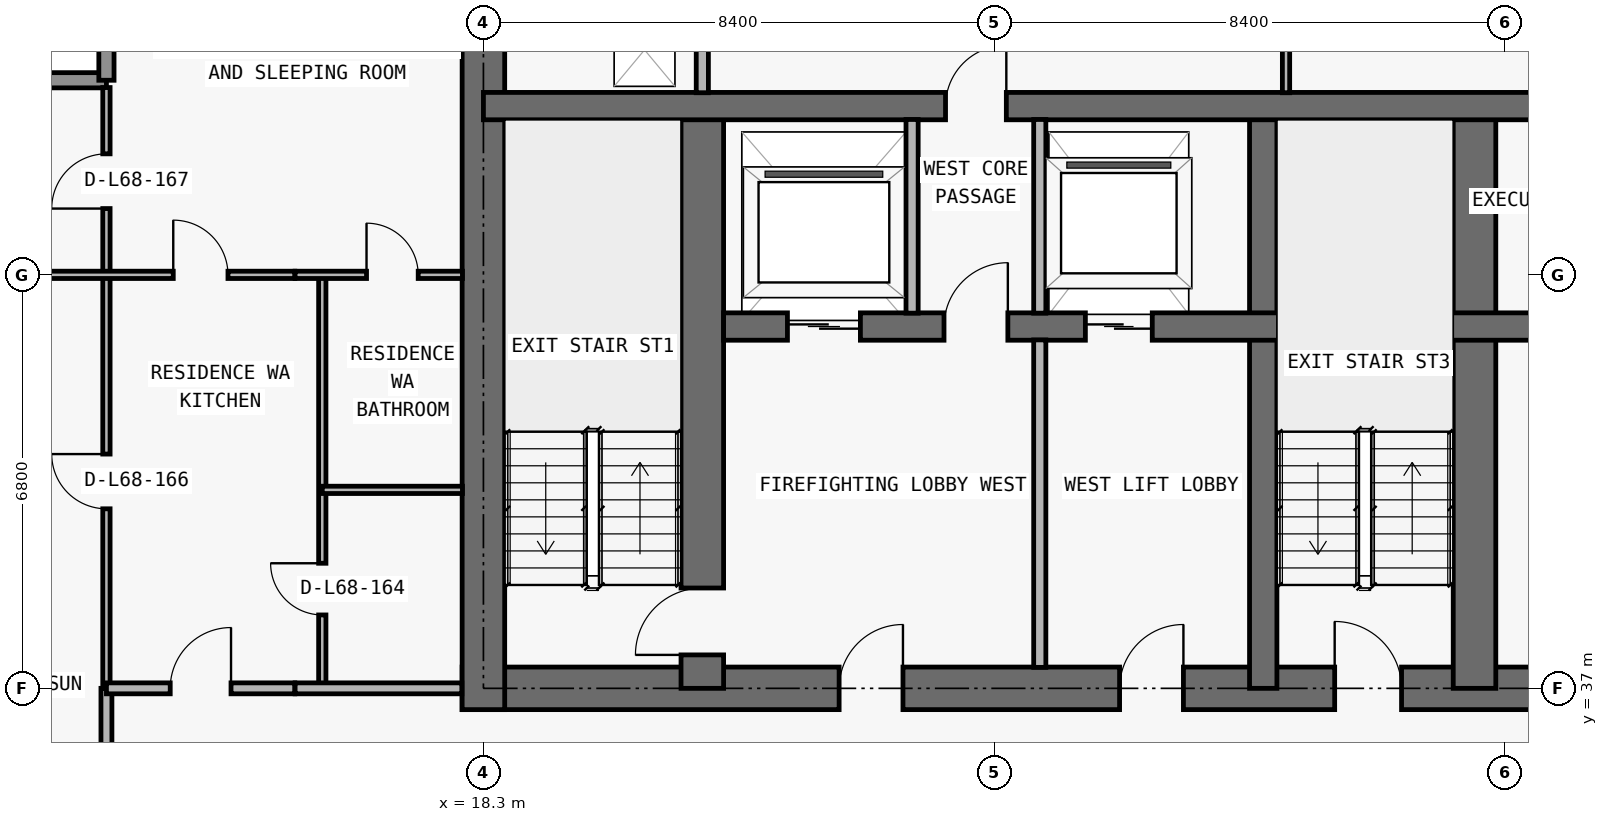
"""IFC4 building model, lengths in metres.
Left out: names, types, materials, properties, quantities, classifications, styles, units other than length and angle.
Written with IfcOpenShell. Run it as: python <this file> out.ifc"""

import sys

from ifc_helpers import new_model, si_unit, direction, frame, frame_2d, origin, place, context, subcontext, project, spatial, rectangle, extrude, element, fill, save


model = new_model("IFC4")
c1 = context("Model", 3, precision=1e-05, world=origin(), true_north=direction((0.0, 1.0)))
c2 = subcontext(c1, "Body", "Model", "MODEL_VIEW")
j1 = project(units=[si_unit("LENGTHUNIT", "METRE"), si_unit("PLANEANGLEUNIT", "RADIAN")], contexts=[c1])
p1 = place(None, origin())
s1 = spatial("IfcSite", under=j1, at=p1, CompositionType="ELEMENT")
p2 = place(p1, origin())
s2 = spatial("IfcBuilding", under=s1, at=p2, CompositionType="ELEMENT")
p3 = place(p2, frame((0.0, 0.0, 243.0)))
s3 = spatial("IfcBuildingStorey", under=s2, at=p3, CompositionType="ELEMENT", Elevation=243.0)
p4 = place(p3, frame((17.95, 37.0, 0.0), z_axis=(0.0, 0.0, 1.0), x_axis=(1.0, 0.0, 0.0)))
e1 = element("IfcWall", 1, at=p4, inside=s3, PredefinedType="SHEAR", context=c2, shape_type="SweptSolid", body=[
    extrude(rectangle(XDim=41.9, YDim=0.7, at=frame_2d((20.95, 0.0))), origin(), (0.0, 0.0, 1.0), 3.05),
])
p5 = place(p4, frame((14.35, 0.0, 0.0)))
e2 = element("IfcOpeningElement", 2, at=p5, cuts=e1, PredefinedType="OPENING", context=c2, shape_type="SweptSolid", body=[
    extrude(rectangle(XDim=1.1, YDim=2.15, at=frame_2d((0.55, 1.075))), frame((0.0, 0.36, 0.0), z_axis=(0.0, -1.0, 0.0), x_axis=(1.0, 0.0, 0.0)), (0.0, 0.0, 1.0), 0.72),
])
p6 = place(p4, frame((6.2, 0.0, 0.0)))
e3 = element("IfcOpeningElement", 3, at=p6, cuts=e1, PredefinedType="OPENING", context=c2, shape_type="SweptSolid", body=[
    extrude(rectangle(XDim=1.05, YDim=2.15, at=frame_2d((0.525, 1.075))), frame((0.0, 0.36, 0.0), z_axis=(0.0, -1.0, 0.0), x_axis=(1.0, 0.0, 0.0)), (0.0, 0.0, 1.0), 0.72),
])
p7 = place(p4, frame((34.7, 0.0, 0.0)))
e4 = element("IfcOpeningElement", 4, at=p7, cuts=e1, PredefinedType="OPENING", context=c2, shape_type="SweptSolid", body=[
    extrude(rectangle(XDim=1.05, YDim=2.15, at=frame_2d((0.525, 1.075))), frame((0.0, 0.36, 0.0), z_axis=(0.0, -1.0, 0.0), x_axis=(1.0, 0.0, 0.0)), (0.0, 0.0, 1.0), 0.72),
])
p8 = place(p4, frame((10.812, 0.0, 0.0)))
e5 = element("IfcOpeningElement", 5, at=p8, cuts=e1, PredefinedType="OPENING", context=c2, shape_type="SweptSolid", body=[
    extrude(rectangle(XDim=1.05, YDim=2.15, at=frame_2d((0.525, 1.075))), frame((0.0, 0.36, 0.0), z_axis=(0.0, -1.0, 0.0), x_axis=(1.0, 0.0, 0.0)), (0.0, 0.0, 1.0), 0.72),
])
p9 = place(p4, frame((24.05, 0.0, 0.0)))
e6 = element("IfcOpeningElement", 6, at=p9, cuts=e1, PredefinedType="OPENING", context=c2, shape_type="SweptSolid", body=[
    extrude(rectangle(XDim=1.05, YDim=2.15, at=frame_2d((0.525, 1.075))), frame((0.0, 0.36, 0.0), z_axis=(0.0, -1.0, 0.0), x_axis=(1.0, 0.0, 0.0)), (0.0, 0.0, 1.0), 0.72),
])
p10 = place(p3, frame((18.3, 36.65, 0.0), z_axis=(0.0, 0.0, 1.0), x_axis=(0.0, 1.0, 0.0)))
e7 = element("IfcWall", 7, at=p10, inside=s3, PredefinedType="SHEAR", context=c2, shape_type="SweptSolid", body=[
    extrude(rectangle(XDim=13.95, YDim=0.7, at=frame_2d((6.975, 0.0))), origin(), (0.0, 0.0, 1.0), 3.05),
])
p11 = place(p3, frame((21.9, 37.0, 0.0), z_axis=(0.0, 0.0, 1.0), x_axis=(0.0, 1.0, 0.0)))
e8 = element("IfcWall", 8, at=p11, inside=s3, PredefinedType="SHEAR", context=c2, shape_type="SweptSolid", body=[
    extrude(rectangle(XDim=9.575, YDim=0.7, at=frame_2d((4.788, 0.0))), origin(), (0.0, 0.0, 1.0), 3.05),
])
p12 = place(p11, frame((0.55, 0.0, 0.0)))
e9 = element("IfcOpeningElement", 9, at=p12, cuts=e8, PredefinedType="OPENING", context=c2, shape_type="SweptSolid", body=[
    extrude(rectangle(XDim=1.1, YDim=2.15, at=frame_2d((0.55, 1.075))), frame((0.0, 0.36, 0.0), z_axis=(0.0, -1.0, 0.0), x_axis=(1.0, 0.0, 0.0)), (0.0, 0.0, 1.0), 0.72),
])
p13 = place(p3, frame((31.125, 37.0, 0.0), z_axis=(0.0, 0.0, 1.0), x_axis=(0.0, 1.0, 0.0)))
e10 = element("IfcWall", 10, at=p13, inside=s3, PredefinedType="SHEAR", context=c2, shape_type="SweptSolid", body=[
    extrude(rectangle(XDim=9.575, YDim=0.45, at=frame_2d((4.788, 0.0))), origin(), (0.0, 0.0, 1.0), 3.05),
])
p14 = place(p3, frame((34.6, 37.0, 0.0), z_axis=(0.0, 0.0, 1.0), x_axis=(0.0, 1.0, 0.0)))
e11 = element("IfcWall", 11, at=p14, inside=s3, PredefinedType="SHEAR", context=c2, shape_type="SweptSolid", body=[
    extrude(rectangle(XDim=9.575, YDim=0.7, at=frame_2d((4.788, 0.0))), origin(), (0.0, 0.0, 1.0), 3.05),
])
p15 = place(p3, frame((22.25, 42.95, 0.0), z_axis=(0.0, 0.0, 1.0), x_axis=(1.0, 0.0, 0.0)))
e12 = element("IfcWall", 12, at=p15, inside=s3, PredefinedType="SHEAR", context=c2, shape_type="SweptSolid", body=[
    extrude(rectangle(XDim=33.3, YDim=0.45, at=frame_2d((16.65, 0.0))), origin(), (0.0, 0.0, 1.0), 3.05),
])
p16 = place(p15, frame((1.05, 0.0, 0.0)))
e13 = element("IfcOpeningElement", 13, at=p16, cuts=e12, PredefinedType="OPENING", context=c2, shape_type="SweptSolid", body=[
    extrude(rectangle(XDim=1.2, YDim=2.2, at=frame_2d((0.6, 1.1))), frame((0.0, 0.235, 0.0), z_axis=(0.0, -1.0, 0.0), x_axis=(1.0, 0.0, 0.0)), (0.0, 0.0, 1.0), 0.47),
])
p17 = place(p15, frame((31.05, 0.0, 0.0)))
e14 = element("IfcOpeningElement", 14, at=p17, cuts=e12, PredefinedType="OPENING", context=c2, shape_type="SweptSolid", body=[
    extrude(rectangle(XDim=1.2, YDim=2.2, at=frame_2d((0.6, 1.1))), frame((0.0, 0.235, 0.0), z_axis=(0.0, -1.0, 0.0), x_axis=(1.0, 0.0, 0.0)), (0.0, 0.0, 1.0), 0.47),
])
p18 = place(p15, frame((26.45, 0.0, 0.0)))
e15 = element("IfcOpeningElement", 15, at=p18, cuts=e12, PredefinedType="OPENING", context=c2, shape_type="SweptSolid", body=[
    extrude(rectangle(XDim=1.1, YDim=2.2, at=frame_2d((0.55, 1.1))), frame((0.0, 0.235, 0.0), z_axis=(0.0, -1.0, 0.0), x_axis=(1.0, 0.0, 0.0)), (0.0, 0.0, 1.0), 0.47),
])
p19 = place(p15, frame((5.95, 0.0, 0.0)))
e16 = element("IfcOpeningElement", 16, at=p19, cuts=e12, PredefinedType="OPENING", context=c2, shape_type="SweptSolid", body=[
    extrude(rectangle(XDim=1.1, YDim=2.2, at=frame_2d((0.55, 1.1))), frame((0.0, 0.235, 0.0), z_axis=(0.0, -1.0, 0.0), x_axis=(1.0, 0.0, 0.0)), (0.0, 0.0, 1.0), 0.47),
])
p20 = place(p15, frame((3.625, 0.0, 0.0)))
e17 = element("IfcOpeningElement", 17, at=p20, cuts=e12, PredefinedType="OPENING", context=c2, shape_type="SweptSolid", body=[
    extrude(rectangle(XDim=1.05, YDim=2.15, at=frame_2d((0.525, 1.075))), frame((0.0, 0.235, 0.0), z_axis=(0.0, -1.0, 0.0), x_axis=(1.0, 0.0, 0.0)), (0.0, 0.0, 1.0), 0.47),
])
p21 = place(p15, frame((28.675, 0.0, 0.0)))
e18 = element("IfcOpeningElement", 18, at=p21, cuts=e12, PredefinedType="OPENING", context=c2, shape_type="SweptSolid", body=[
    extrude(rectangle(XDim=1.05, YDim=2.15, at=frame_2d((0.525, 1.075))), frame((0.0, 0.235, 0.0), z_axis=(0.0, -1.0, 0.0), x_axis=(1.0, 0.0, 0.0)), (0.0, 0.0, 1.0), 0.47),
])
p22 = place(p15, frame((14.7, 0.0, 0.0)))
e19 = element("IfcOpeningElement", 19, at=p22, cuts=e12, PredefinedType="OPENING", context=c2, shape_type="SweptSolid", body=[
    extrude(rectangle(XDim=1.0, YDim=2.2, at=frame_2d((0.5, 1.1))), frame((0.0, 0.235, 0.0), z_axis=(0.0, -1.0, 0.0), x_axis=(1.0, 0.0, 0.0)), (0.0, 0.0, 1.0), 0.47),
])
p23 = place(p15, frame((21.45, 0.0, 0.0)))
e20 = element("IfcOpeningElement", 20, at=p23, cuts=e12, PredefinedType="OPENING", context=c2, shape_type="SweptSolid", body=[
    extrude(rectangle(XDim=1.0, YDim=2.2, at=frame_2d((0.5, 1.1))), frame((0.0, 0.235, 0.0), z_axis=(0.0, -1.0, 0.0), x_axis=(1.0, 0.0, 0.0)), (0.0, 0.0, 1.0), 0.47),
])
p24 = place(p3, frame((18.3, 46.575, 0.0), z_axis=(0.0, 0.0, 1.0), x_axis=(1.0, 0.0, 0.0)))
e21 = element("IfcWall", 21, at=p24, inside=s3, PredefinedType="SHEAR", context=c2, shape_type="SweptSolid", body=[
    extrude(rectangle(XDim=41.2, YDim=0.45, at=frame_2d((20.6, 0.0))), origin(), (0.0, 0.0, 1.0), 3.05),
])
p25 = place(p24, frame((7.6, 0.0, 0.0)))
e22 = element("IfcOpeningElement", 22, at=p25, cuts=e21, PredefinedType="OPENING", context=c2, shape_type="SweptSolid", body=[
    extrude(rectangle(XDim=1.0, YDim=2.2, at=frame_2d((0.5, 1.1))), frame((0.0, 0.235, 0.0), z_axis=(0.0, -1.0, 0.0), x_axis=(1.0, 0.0, 0.0)), (0.0, 0.0, 1.0), 0.47),
])
p26 = place(p24, frame((32.625, 0.0, 0.0)))
e23 = element("IfcOpeningElement", 23, at=p26, cuts=e21, PredefinedType="OPENING", context=c2, shape_type="SweptSolid", body=[
    extrude(rectangle(XDim=1.05, YDim=2.15, at=frame_2d((0.525, 1.075))), frame((0.0, 0.235, 0.0), z_axis=(0.0, -1.0, 0.0), x_axis=(1.0, 0.0, 0.0)), (0.0, 0.0, 1.0), 0.47),
])
p27 = place(p3, frame((8.25, 47.0, 0.0), z_axis=(0.0, 0.0, 1.0), x_axis=(1.0, 0.0, 0.0)))
e24 = element("IfcWall", 24, at=p27, inside=s3, PredefinedType="ELEMENTEDWALL", context=c2, shape_type="SweptSolid", body=[
    extrude(rectangle(XDim=3.85, YDim=0.25, at=frame_2d((1.925, 0.0))), origin(), (0.0, 0.0, 1.0), 3.05),
])
p28 = place(p3, frame((12.1, 47.0, 0.0), z_axis=(0.0, 0.0, 1.0), x_axis=(0.0, 1.0, 0.0)))
e25 = element("IfcWall", 25, at=p28, inside=s3, PredefinedType="ELEMENTEDWALL", context=c2, shape_type="SweptSolid", body=[
    extrude(rectangle(XDim=3.45, YDim=0.25, at=frame_2d((1.725, 0.0))), origin(), (0.0, 0.0, 1.0), 3.05),
])
p29 = place(p3, frame((12.1, 33.705, 0.0), z_axis=(0.0, 0.0, 1.0), x_axis=(0.0, 1.0, 0.0)))
e26 = element("IfcWall", 26, at=p29, inside=s3, PredefinedType="PARTITIONING", context=c2, shape_type="SweptSolid", body=[
    extrude(rectangle(XDim=3.295, YDim=0.18, at=frame_2d((1.647, 0.0))), origin(), (0.0, 0.0, 1.0), 3.05),
])
p30 = place(p3, frame((12.1, 37.005, 0.0), z_axis=(0.0, 0.0, 1.0), x_axis=(0.0, 1.0, 0.0)))
e27 = element("IfcWall", 27, at=p30, inside=s3, PredefinedType="PARTITIONING", context=c2, shape_type="SweptSolid", body=[
    extrude(rectangle(XDim=9.875, YDim=0.12, at=frame_2d((4.938, 0.0))), origin(), (0.0, 0.0, 1.0), 3.05),
])
p31 = place(p30, frame((2.948, 0.0, 0.0)))
e28 = element("IfcOpeningElement", 28, at=p31, cuts=e27, PredefinedType="OPENING", context=c2, shape_type="SweptSolid", body=[
    extrude(rectangle(XDim=0.9, YDim=2.15, at=frame_2d((0.45, 1.075))), frame((0.0, 0.07, 0.0), z_axis=(0.0, -1.0, 0.0), x_axis=(1.0, 0.0, 0.0)), (0.0, 0.0, 1.0), 0.14),
])
p32 = place(p30, frame((7.885, 0.0, 0.0)))
e29 = element("IfcOpeningElement", 29, at=p32, cuts=e27, PredefinedType="OPENING", context=c2, shape_type="SweptSolid", body=[
    extrude(rectangle(XDim=0.9, YDim=2.15, at=frame_2d((0.45, 1.075))), frame((0.0, 0.07, 0.0), z_axis=(0.0, -1.0, 0.0), x_axis=(1.0, 0.0, 0.0)), (0.0, 0.0, 1.0), 0.14),
])
p33 = place(p3, frame((15.65, 37.0, 0.0), z_axis=(0.0, 0.0, 1.0), x_axis=(0.0, 1.0, 0.0)))
e30 = element("IfcWall", 30, at=p33, inside=s3, PredefinedType="PARTITIONING", context=c2, shape_type="SweptSolid", body=[
    extrude(rectangle(XDim=6.8, YDim=0.12, at=frame_2d((3.4, 0.0))), origin(), (0.0, 0.0, 1.0), 2.725),
])
p34 = place(p33, frame((1.207, 0.0, 0.0)))
e31 = element("IfcOpeningElement", 31, at=p34, cuts=e30, PredefinedType="OPENING", context=c2, shape_type="SweptSolid", body=[
    extrude(rectangle(XDim=0.85, YDim=2.1, at=frame_2d((0.425, 1.05))), frame((0.0, 0.07, 0.0), z_axis=(0.0, -1.0, 0.0), x_axis=(1.0, 0.0, 0.0)), (0.0, 0.0, 1.0), 0.14),
])
p35 = place(p3, frame((21.9, 46.795, 0.0), z_axis=(0.0, 0.0, 1.0), x_axis=(0.0, 1.0, 0.0)))
e32 = element("IfcWall", 32, at=p35, inside=s3, PredefinedType="PARTITIONING", context=c2, shape_type="SweptSolid", body=[
    extrude(rectangle(XDim=3.16, YDim=0.2, at=frame_2d((1.58, 0.0))), origin(), (0.0, 0.0, 1.0), 3.05),
])
p36 = place(p3, frame((25.35, 43.17, 0.0), z_axis=(0.0, 0.0, 1.0), x_axis=(0.0, 1.0, 0.0)))
e33 = element("IfcWall", 33, at=p36, inside=s3, PredefinedType="PARTITIONING", context=c2, shape_type="SweptSolid", body=[
    extrude(rectangle(XDim=3.185, YDim=0.2, at=frame_2d((1.593, 0.0))), origin(), (0.0, 0.0, 1.0), 3.05),
])
p37 = place(p3, frame((27.45, 37.345, 0.0), z_axis=(0.0, 0.0, 1.0), x_axis=(0.0, 1.0, 0.0)))
e34 = element("IfcWall", 34, at=p37, inside=s3, PredefinedType="PARTITIONING", context=c2, shape_type="SweptSolid", body=[
    extrude(rectangle(XDim=5.385, YDim=0.2, at=frame_2d((2.692, 0.0))), origin(), (0.0, 0.0, 1.0), 3.05),
])
p38 = place(p3, frame((27.45, 43.17, 0.0), z_axis=(0.0, 0.0, 1.0), x_axis=(0.0, 1.0, 0.0)))
e35 = element("IfcWall", 35, at=p38, inside=s3, PredefinedType="PARTITIONING", context=c2, shape_type="SweptSolid", body=[
    extrude(rectangle(XDim=3.185, YDim=0.2, at=frame_2d((1.593, 0.0))), origin(), (0.0, 0.0, 1.0), 3.05),
])
p39 = place(p3, frame((31.5, 46.795, 0.0), z_axis=(0.0, 0.0, 1.0), x_axis=(0.0, 1.0, 0.0)))
e36 = element("IfcWall", 36, at=p39, inside=s3, PredefinedType="PARTITIONING", context=c2, shape_type="SweptSolid", body=[
    extrude(rectangle(XDim=3.16, YDim=0.12, at=frame_2d((1.58, 0.0))), origin(), (0.0, 0.0, 1.0), 3.05),
])
p40 = place(p3, frame((12.1, 37.0, 0.0), z_axis=(0.0, 0.0, 1.0), x_axis=(1.0, 0.0, 0.0)))
e37 = element("IfcWall", 37, at=p40, inside=s3, PredefinedType="PARTITIONING", context=c2, shape_type="SweptSolid", body=[
    extrude(rectangle(XDim=3.098, YDim=0.18, at=frame_2d((1.549, 0.0))), origin(), (0.0, 0.0, 1.0), 3.05),
])
p41 = place(p40, frame((1.049, 0.0, 0.0)))
e38 = element("IfcOpeningElement", 38, at=p41, cuts=e37, PredefinedType="OPENING", context=c2, shape_type="SweptSolid", body=[
    extrude(rectangle(XDim=1.0, YDim=2.2, at=frame_2d((0.5, 1.1))), frame((0.0, 0.1, 0.0), z_axis=(0.0, -1.0, 0.0), x_axis=(1.0, 0.0, 0.0)), (0.0, 0.0, 1.0), 0.2),
])
p42 = place(p3, frame((15.203, 37.0, 0.0), z_axis=(0.0, 0.0, 1.0), x_axis=(1.0, 0.0, 0.0)))
e39 = element("IfcWall", 39, at=p42, inside=s3, PredefinedType="PARTITIONING", context=c2, shape_type="SweptSolid", body=[
    extrude(rectangle(XDim=2.742, YDim=0.18, at=frame_2d((1.371, 0.0))), origin(), (0.0, 0.0, 1.0), 3.05),
])
p43 = place(p3, frame((15.65, 40.264, 0.0), z_axis=(0.0, 0.0, 1.0), x_axis=(1.0, 0.0, 0.0)))
e40 = element("IfcWall", 40, at=p43, inside=s3, PredefinedType="PARTITIONING", context=c2, shape_type="SweptSolid", body=[
    extrude(rectangle(XDim=2.305, YDim=0.12, at=frame_2d((1.153, 0.0))), origin(), (0.0, 0.0, 1.0), 3.05),
])
p44 = place(p3, frame((8.395, 43.8, 0.0), z_axis=(0.0, 0.0, 1.0), x_axis=(1.0, 0.0, 0.0)))
e41 = element("IfcWall", 41, at=p44, inside=s3, PredefinedType="PARTITIONING", context=c2, shape_type="SweptSolid", body=[
    extrude(rectangle(XDim=6.803, YDim=0.12, at=frame_2d((3.401, 0.0))), origin(), (0.0, 0.0, 1.0), 2.418),
])
p45 = place(p44, frame((4.804, 0.0, 0.0)))
e42 = element("IfcOpeningElement", 42, at=p45, cuts=e41, PredefinedType="OPENING", context=c2, shape_type="SweptSolid", body=[
    extrude(rectangle(XDim=0.9, YDim=2.15, at=frame_2d((0.45, 1.075))), frame((0.0, 0.07, 0.0), z_axis=(0.0, -1.0, 0.0), x_axis=(1.0, 0.0, 0.0)), (0.0, 0.0, 1.0), 0.14),
])
p46 = place(p3, frame((15.203, 43.8, 0.0), z_axis=(0.0, 0.0, 1.0), x_axis=(1.0, 0.0, 0.0)))
e43 = element("IfcWall", 43, at=p46, inside=s3, PredefinedType="PARTITIONING", context=c2, shape_type="SweptSolid", body=[
    extrude(rectangle(XDim=2.752, YDim=0.12, at=frame_2d((1.376, 0.0))), origin(), (0.0, 0.0, 1.0), 2.418),
])
p47 = place(p46, frame((1.175, 0.0, 0.0)))
e44 = element("IfcOpeningElement", 44, at=p47, cuts=e43, PredefinedType="OPENING", context=c2, shape_type="SweptSolid", body=[
    extrude(rectangle(XDim=0.85, YDim=2.1, at=frame_2d((0.425, 1.05))), frame((0.0, 0.07, 0.0), z_axis=(0.0, -1.0, 0.0), x_axis=(1.0, 0.0, 0.0)), (0.0, 0.0, 1.0), 0.14),
])
p48 = place(p16, origin())
e45 = element("IfcDoor", 45, at=p48, inside=s3, OperationType="DOUBLE_DOOR_SLIDING", PredefinedType="DOOR", context=c2, shape_type="SweptSolid", body=[
    extrude(rectangle(XDim=1.2, YDim=2.2, at=frame_2d((0.6, 1.1))), frame((0.0, 0.025, 0.0), z_axis=(0.0, -1.0, 0.0), x_axis=(1.0, 0.0, 0.0)), (0.0, 0.0, 1.0), 0.05),
])
fill(e13, e45)
p49 = place(p19, origin())
e46 = element("IfcDoor", 46, at=p49, inside=s3, OperationType="DOUBLE_DOOR_SLIDING", PredefinedType="DOOR", context=c2, shape_type="SweptSolid", body=[
    extrude(rectangle(XDim=1.1, YDim=2.2, at=frame_2d((0.55, 1.1))), frame((0.0, 0.025, 0.0), z_axis=(0.0, -1.0, 0.0), x_axis=(1.0, 0.0, 0.0)), (0.0, 0.0, 1.0), 0.05),
])
fill(e16, e46)
p50 = place(p5, origin())
e47 = element("IfcDoor", 47, at=p50, inside=s3, OperationType="SINGLE_SWING_LEFT", PredefinedType="DOOR", context=c2, shape_type="SweptSolid", body=[
    extrude(rectangle(XDim=1.1, YDim=2.15, at=frame_2d((0.55, 1.075))), frame((0.0, 0.025, 0.0), z_axis=(0.0, -1.0, 0.0), x_axis=(1.0, 0.0, 0.0)), (0.0, 0.0, 1.0), 0.05),
])
fill(e2, e47)
p51 = place(p6, origin())
e48 = element("IfcDoor", 48, at=p51, inside=s3, OperationType="SINGLE_SWING_RIGHT", PredefinedType="DOOR", context=c2, shape_type="SweptSolid", body=[
    extrude(rectangle(XDim=1.05, YDim=2.15, at=frame_2d((0.525, 1.075))), frame((0.0, 0.025, 0.0), z_axis=(0.0, -1.0, 0.0), x_axis=(1.0, 0.0, 0.0)), (0.0, 0.0, 1.0), 0.05),
])
fill(e3, e48)
p52 = place(p12, origin())
e49 = element("IfcDoor", 49, at=p52, inside=s3, OperationType="SINGLE_SWING_LEFT", PredefinedType="DOOR", context=c2, shape_type="SweptSolid", body=[
    extrude(rectangle(XDim=1.1, YDim=2.15, at=frame_2d((0.55, 1.075))), frame((0.0, 0.025, 0.0), z_axis=(0.0, -1.0, 0.0), x_axis=(1.0, 0.0, 0.0)), (0.0, 0.0, 1.0), 0.05),
])
fill(e9, e49)
p53 = place(p20, origin())
e50 = element("IfcDoor", 50, at=p53, inside=s3, OperationType="SINGLE_SWING_RIGHT", PredefinedType="DOOR", context=c2, shape_type="SweptSolid", body=[
    extrude(rectangle(XDim=1.05, YDim=2.15, at=frame_2d((0.525, 1.075))), frame((0.0, 0.025, 0.0), z_axis=(0.0, -1.0, 0.0), x_axis=(1.0, 0.0, 0.0)), (0.0, 0.0, 1.0), 0.05),
])
fill(e17, e50)
p54 = place(p8, origin())
e51 = element("IfcDoor", 51, at=p54, inside=s3, OperationType="SINGLE_SWING_RIGHT", PredefinedType="DOOR", context=c2, shape_type="SweptSolid", body=[
    extrude(rectangle(XDim=1.05, YDim=2.15, at=frame_2d((0.525, 1.075))), frame((0.0, 0.025, 0.0), z_axis=(0.0, -1.0, 0.0), x_axis=(1.0, 0.0, 0.0)), (0.0, 0.0, 1.0), 0.05),
])
fill(e5, e51)
p55 = place(p25, origin())
e52 = element("IfcDoor", 52, at=p55, inside=s3, OperationType="SINGLE_SWING_RIGHT", PredefinedType="DOOR", context=c2, shape_type="SweptSolid", body=[
    extrude(rectangle(XDim=1.0, YDim=2.2, at=frame_2d((0.5, 1.1))), frame((0.0, 0.025, 0.0), z_axis=(0.0, -1.0, 0.0), x_axis=(1.0, 0.0, 0.0)), (0.0, 0.0, 1.0), 0.05),
])
fill(e22, e52)
p56 = place(p41, origin())
e53 = element("IfcDoor", 53, at=p56, inside=s3, OperationType="SINGLE_SWING_RIGHT", PredefinedType="DOOR", context=c2, shape_type="SweptSolid", body=[
    extrude(rectangle(XDim=1.0, YDim=2.2, at=frame_2d((0.5, 1.1))), frame((0.0, 0.025, 0.0), z_axis=(0.0, -1.0, 0.0), x_axis=(1.0, 0.0, 0.0)), (0.0, 0.0, 1.0), 0.05),
])
fill(e38, e53)
p57 = place(p45, origin())
e54 = element("IfcDoor", 54, at=p57, inside=s3, OperationType="SINGLE_SWING_LEFT", PredefinedType="DOOR", context=c2, shape_type="SweptSolid", body=[
    extrude(rectangle(XDim=0.9, YDim=2.15, at=frame_2d((0.45, 1.075))), frame((0.0, 0.025, 0.0), z_axis=(0.0, -1.0, 0.0), x_axis=(1.0, 0.0, 0.0)), (0.0, 0.0, 1.0), 0.05),
])
fill(e42, e54)
p58 = place(p34, origin())
e55 = element("IfcDoor", 55, at=p58, inside=s3, OperationType="SINGLE_SWING_RIGHT", PredefinedType="DOOR", context=c2, shape_type="SweptSolid", body=[
    extrude(rectangle(XDim=0.85, YDim=2.1, at=frame_2d((0.425, 1.05))), frame((0.0, 0.025, 0.0), z_axis=(0.0, -1.0, 0.0), x_axis=(1.0, 0.0, 0.0)), (0.0, 0.0, 1.0), 0.05),
])
fill(e31, e55)
p59 = place(p47, origin())
e56 = element("IfcDoor", 56, at=p59, inside=s3, OperationType="SINGLE_SWING_LEFT", PredefinedType="DOOR", context=c2, shape_type="SweptSolid", body=[
    extrude(rectangle(XDim=0.85, YDim=2.1, at=frame_2d((0.425, 1.05))), frame((0.0, 0.025, 0.0), z_axis=(0.0, -1.0, 0.0), x_axis=(1.0, 0.0, 0.0)), (0.0, 0.0, 1.0), 0.05),
])
fill(e44, e56)
p60 = place(p31, origin())
e57 = element("IfcDoor", 57, at=p60, inside=s3, OperationType="SINGLE_SWING_RIGHT", PredefinedType="DOOR", context=c2, shape_type="SweptSolid", body=[
    extrude(rectangle(XDim=0.9, YDim=2.15, at=frame_2d((0.45, 1.075))), frame((0.0, 0.025, 0.0), z_axis=(0.0, -1.0, 0.0), x_axis=(1.0, 0.0, 0.0)), (0.0, 0.0, 1.0), 0.05),
])
fill(e28, e57)
p61 = place(p32, origin())
e58 = element("IfcDoor", 58, at=p61, inside=s3, OperationType="SINGLE_SWING_LEFT", PredefinedType="DOOR", context=c2, shape_type="SweptSolid", body=[
    extrude(rectangle(XDim=0.9, YDim=2.15, at=frame_2d((0.45, 1.075))), frame((0.0, 0.025, 0.0), z_axis=(0.0, -1.0, 0.0), x_axis=(1.0, 0.0, 0.0)), (0.0, 0.0, 1.0), 0.05),
])
fill(e29, e58)
save(model, sys.argv[1])
